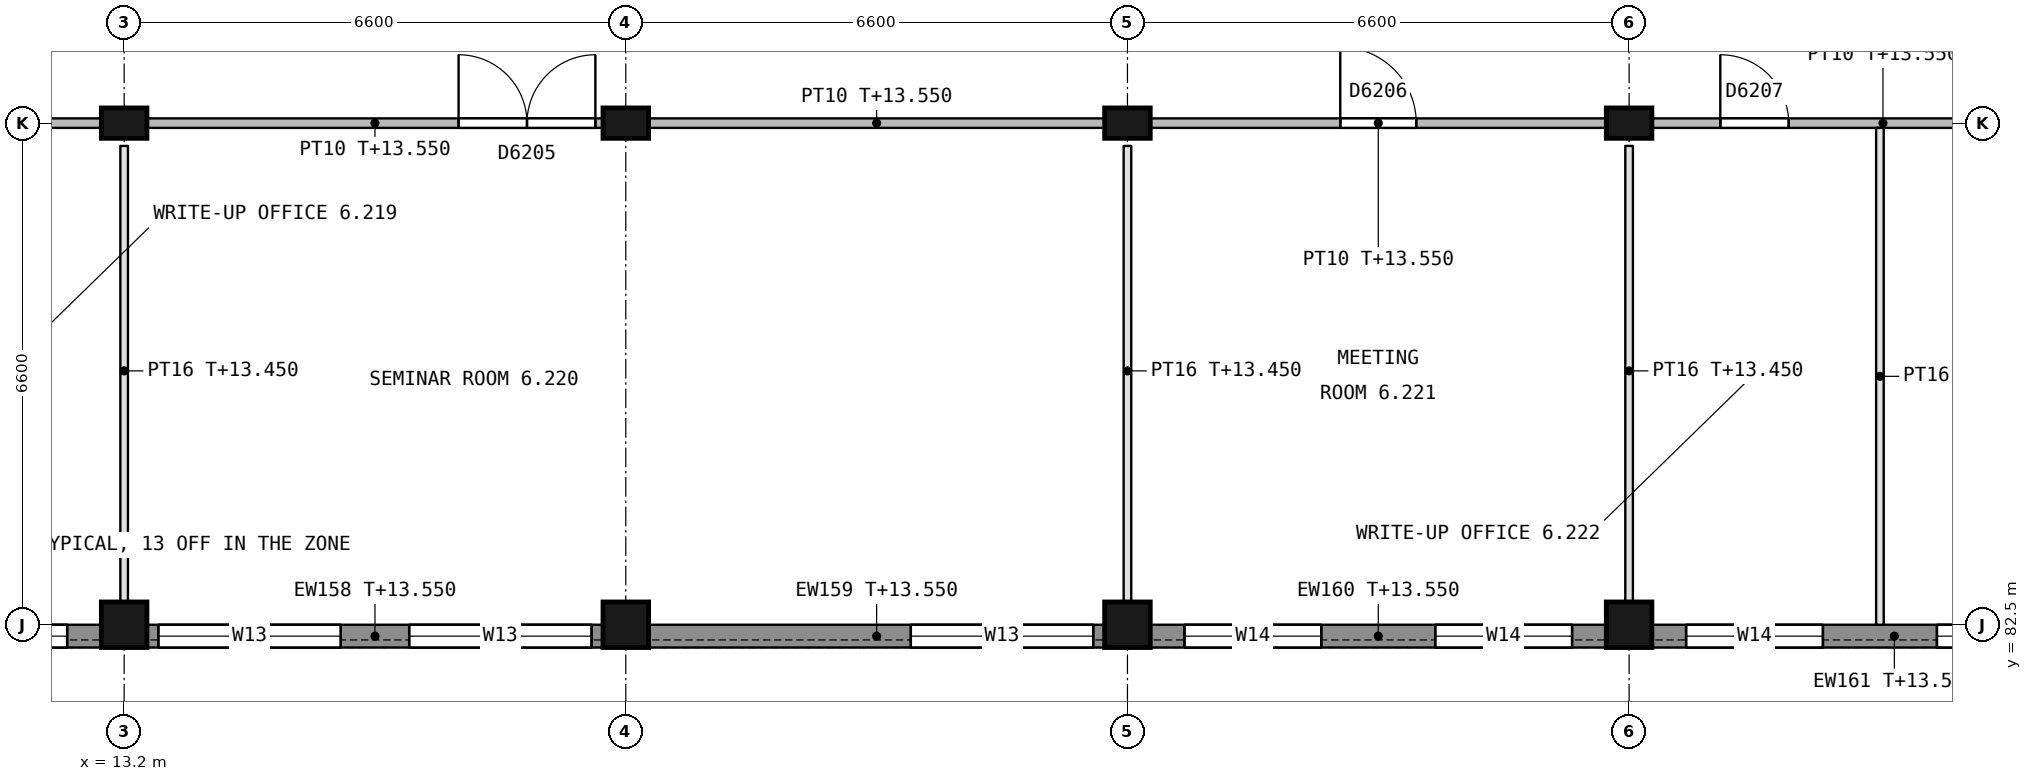
"""IFC4 building model, lengths in metres.
Left out: names, types, materials, properties, quantities, classifications, styles, units other than length and angle.
Written with IfcOpenShell. Run it as: python <this file> out.ifc"""

import sys

from ifc_helpers import new_model, si_unit, direction, frame, frame_2d, origin, origin_2d, place, context, subcontext, project, spatial, rectangle, extrude, element, fill, save


model = new_model("IFC4")
c1 = context("Model", 3, precision=1e-05, world=origin(), true_north=direction((0.0, 1.0)))
c2 = subcontext(c1, "Body", "Model", "MODEL_VIEW")
j1 = project(units=[si_unit("LENGTHUNIT", "METRE"), si_unit("PLANEANGLEUNIT", "RADIAN")], contexts=[c1])
p1 = place(None, origin())
s1 = spatial("IfcSite", under=j1, at=p1, CompositionType="ELEMENT")
p2 = place(p1, origin())
s2 = spatial("IfcBuilding", under=s1, at=p2, CompositionType="ELEMENT")
p3 = place(p2, frame((0.0, 0.0, 9.9)))
s3 = spatial("IfcBuildingStorey", under=s2, at=p3, CompositionType="ELEMENT", Elevation=9.9)
p4 = place(p3, frame((13.2, 82.5, 0.0), z_axis=(0.0, 0.0, 1.0), x_axis=(1.0, 0.0, 0.0)))
e1 = element("IfcColumn", 1, at=p4, inside=s3, PredefinedType="COLUMN", context=c2, shape_type="SweptSolid", body=[
    extrude(rectangle(XDim=0.6, YDim=0.6, at=origin_2d()), origin(), (0.0, 0.0, 1.0), 4.5),
])
p5 = place(p3, frame((13.2, 89.1, 0.0), z_axis=(0.0, 0.0, 1.0), x_axis=(1.0, 0.0, 0.0)))
e2 = element("IfcColumn", 2, at=p5, inside=s3, PredefinedType="COLUMN", context=c2, shape_type="SweptSolid", body=[
    extrude(rectangle(XDim=0.6, YDim=0.4, at=origin_2d()), origin(), (0.0, 0.0, 1.0), 4.5),
])
p6 = place(p3, frame((19.8, 82.5, 0.0), z_axis=(0.0, 0.0, 1.0), x_axis=(1.0, 0.0, 0.0)))
e3 = element("IfcColumn", 3, at=p6, inside=s3, PredefinedType="COLUMN", context=c2, shape_type="SweptSolid", body=[
    extrude(rectangle(XDim=0.6, YDim=0.6, at=origin_2d()), origin(), (0.0, 0.0, 1.0), 4.5),
])
p7 = place(p3, frame((19.8, 89.1, 0.0), z_axis=(0.0, 0.0, 1.0), x_axis=(1.0, 0.0, 0.0)))
e4 = element("IfcColumn", 4, at=p7, inside=s3, PredefinedType="COLUMN", context=c2, shape_type="SweptSolid", body=[
    extrude(rectangle(XDim=0.6, YDim=0.4, at=origin_2d()), origin(), (0.0, 0.0, 1.0), 4.5),
])
p8 = place(p3, frame((26.4, 82.5, 0.0), z_axis=(0.0, 0.0, 1.0), x_axis=(1.0, 0.0, 0.0)))
e5 = element("IfcColumn", 5, at=p8, inside=s3, PredefinedType="COLUMN", context=c2, shape_type="SweptSolid", body=[
    extrude(rectangle(XDim=0.6, YDim=0.6, at=origin_2d()), origin(), (0.0, 0.0, 1.0), 4.5),
])
p9 = place(p3, frame((26.4, 89.1, 0.0), z_axis=(0.0, 0.0, 1.0), x_axis=(1.0, 0.0, 0.0)))
e6 = element("IfcColumn", 6, at=p9, inside=s3, PredefinedType="COLUMN", context=c2, shape_type="SweptSolid", body=[
    extrude(rectangle(XDim=0.6, YDim=0.4, at=origin_2d()), origin(), (0.0, 0.0, 1.0), 4.5),
])
p10 = place(p3, frame((33.0, 82.5, 0.0), z_axis=(0.0, 0.0, 1.0), x_axis=(1.0, 0.0, 0.0)))
e7 = element("IfcColumn", 7, at=p10, inside=s3, PredefinedType="COLUMN", context=c2, shape_type="SweptSolid", body=[
    extrude(rectangle(XDim=0.6, YDim=0.6, at=origin_2d()), origin(), (0.0, 0.0, 1.0), 4.5),
])
p11 = place(p3, frame((33.0, 89.1, 0.0), z_axis=(0.0, 0.0, 1.0), x_axis=(1.0, 0.0, 0.0)))
e8 = element("IfcColumn", 8, at=p11, inside=s3, PredefinedType="COLUMN", context=c2, shape_type="SweptSolid", body=[
    extrude(rectangle(XDim=0.6, YDim=0.4, at=origin_2d()), origin(), (0.0, 0.0, 1.0), 4.5),
])
p12 = place(p3, frame((12.9, 82.35, 0.0), z_axis=(0.0, 0.0, 1.0), x_axis=(-1.0, 0.0, 0.0)))
e9 = element("IfcWall", 9, at=p12, inside=s3, PredefinedType="STANDARD", context=c2, shape_type="SweptSolid", body=[
    extrude(rectangle(XDim=6.0, YDim=0.3, at=frame_2d((3.0, 0.0))), origin(), (0.0, 0.0, 1.0), 3.65),
])
p13 = place(p12, frame((3.75, 0.0, 0.9)))
e10 = element("IfcOpeningElement", 10, at=p13, cuts=e9, PredefinedType="OPENING", context=c2, shape_type="SweptSolid", body=[
    extrude(rectangle(XDim=1.8, YDim=1.5, at=frame_2d((0.9, 0.75))), frame((0.0, 0.16, 0.0), z_axis=(0.0, -1.0, 0.0), x_axis=(1.0, 0.0, 0.0)), (0.0, 0.0, 1.0), 0.32),
])
p14 = place(p12, frame((0.45, 0.0, 0.9)))
e11 = element("IfcOpeningElement", 11, at=p14, cuts=e9, PredefinedType="OPENING", context=c2, shape_type="SweptSolid", body=[
    extrude(rectangle(XDim=1.8, YDim=1.5, at=frame_2d((0.9, 0.75))), frame((0.0, 0.16, 0.0), z_axis=(0.0, -1.0, 0.0), x_axis=(1.0, 0.0, 0.0)), (0.0, 0.0, 1.0), 0.32),
])
p15 = place(p3, frame((19.5, 82.35, 0.0), z_axis=(0.0, 0.0, 1.0), x_axis=(-1.0, 0.0, 0.0)))
e12 = element("IfcWall", 12, at=p15, inside=s3, PredefinedType="STANDARD", context=c2, shape_type="SweptSolid", body=[
    extrude(rectangle(XDim=6.0, YDim=0.3, at=frame_2d((3.0, 0.0))), origin(), (0.0, 0.0, 1.0), 3.65),
])
p16 = place(p15, frame((3.45, 0.0, 0.9)))
e13 = element("IfcOpeningElement", 13, at=p16, cuts=e12, PredefinedType="OPENING", context=c2, shape_type="SweptSolid", body=[
    extrude(rectangle(XDim=2.4, YDim=1.8, at=frame_2d((1.2, 0.9))), frame((0.0, 0.16, 0.0), z_axis=(0.0, -1.0, 0.0), x_axis=(1.0, 0.0, 0.0)), (0.0, 0.0, 1.0), 0.32),
])
p17 = place(p15, frame((0.15, 0.0, 0.9)))
e14 = element("IfcOpeningElement", 14, at=p17, cuts=e12, PredefinedType="OPENING", context=c2, shape_type="SweptSolid", body=[
    extrude(rectangle(XDim=2.4, YDim=1.8, at=frame_2d((1.2, 0.9))), frame((0.0, 0.16, 0.0), z_axis=(0.0, -1.0, 0.0), x_axis=(1.0, 0.0, 0.0)), (0.0, 0.0, 1.0), 0.32),
])
p18 = place(p3, frame((26.1, 82.35, 0.0), z_axis=(0.0, 0.0, 1.0), x_axis=(-1.0, 0.0, 0.0)))
e15 = element("IfcWall", 15, at=p18, inside=s3, PredefinedType="STANDARD", context=c2, shape_type="SweptSolid", body=[
    extrude(rectangle(XDim=6.0, YDim=0.3, at=frame_2d((3.0, 0.0))), origin(), (0.0, 0.0, 1.0), 3.65),
])
p19 = place(p18, frame((0.15, 0.0, 0.9)))
e16 = element("IfcOpeningElement", 16, at=p19, cuts=e15, PredefinedType="OPENING", context=c2, shape_type="SweptSolid", body=[
    extrude(rectangle(XDim=2.4, YDim=1.8, at=frame_2d((1.2, 0.9))), frame((0.0, 0.16, 0.0), z_axis=(0.0, -1.0, 0.0), x_axis=(1.0, 0.0, 0.0)), (0.0, 0.0, 1.0), 0.32),
])
p20 = place(p3, frame((32.7, 82.35, 0.0), z_axis=(0.0, 0.0, 1.0), x_axis=(-1.0, 0.0, 0.0)))
e17 = element("IfcWall", 17, at=p20, inside=s3, PredefinedType="STANDARD", context=c2, shape_type="SweptSolid", body=[
    extrude(rectangle(XDim=6.0, YDim=0.3, at=frame_2d((3.0, 0.0))), origin(), (0.0, 0.0, 1.0), 3.65),
])
p21 = place(p20, frame((3.75, 0.0, 0.9)))
e18 = element("IfcOpeningElement", 18, at=p21, cuts=e17, PredefinedType="OPENING", context=c2, shape_type="SweptSolid", body=[
    extrude(rectangle(XDim=1.8, YDim=1.5, at=frame_2d((0.9, 0.75))), frame((0.0, 0.16, 0.0), z_axis=(0.0, -1.0, 0.0), x_axis=(1.0, 0.0, 0.0)), (0.0, 0.0, 1.0), 0.32),
])
p22 = place(p20, frame((0.45, 0.0, 0.9)))
e19 = element("IfcOpeningElement", 19, at=p22, cuts=e17, PredefinedType="OPENING", context=c2, shape_type="SweptSolid", body=[
    extrude(rectangle(XDim=1.8, YDim=1.5, at=frame_2d((0.9, 0.75))), frame((0.0, 0.16, 0.0), z_axis=(0.0, -1.0, 0.0), x_axis=(1.0, 0.0, 0.0)), (0.0, 0.0, 1.0), 0.32),
])
p23 = place(p3, frame((39.6, 82.35, 0.0), z_axis=(0.0, 0.0, 1.0), x_axis=(-1.0, 0.0, 0.0)))
e20 = element("IfcWall", 20, at=p23, inside=s3, PredefinedType="STANDARD", context=c2, shape_type="SweptSolid", body=[
    extrude(rectangle(XDim=6.3, YDim=0.3, at=frame_2d((3.15, 0.0))), origin(), (0.0, 0.0, 1.0), 3.65),
])
p24 = place(p23, frame((4.05, 0.0, 0.9)))
e21 = element("IfcOpeningElement", 21, at=p24, cuts=e20, PredefinedType="OPENING", context=c2, shape_type="SweptSolid", body=[
    extrude(rectangle(XDim=1.8, YDim=1.5, at=frame_2d((0.9, 0.75))), frame((0.0, 0.16, 0.0), z_axis=(0.0, -1.0, 0.0), x_axis=(1.0, 0.0, 0.0)), (0.0, 0.0, 1.0), 0.32),
])
p25 = place(p23, frame((0.75, 0.0, 0.9)))
e22 = element("IfcOpeningElement", 22, at=p25, cuts=e20, PredefinedType="OPENING", context=c2, shape_type="SweptSolid", body=[
    extrude(rectangle(XDim=1.8, YDim=1.5, at=frame_2d((0.9, 0.75))), frame((0.0, 0.16, 0.0), z_axis=(0.0, -1.0, 0.0), x_axis=(1.0, 0.0, 0.0)), (0.0, 0.0, 1.0), 0.32),
])
p26 = place(p3, frame((12.9, 89.1, 0.0), z_axis=(0.0, 0.0, 1.0), x_axis=(-1.0, 0.0, 0.0)))
e23 = element("IfcWall", 23, at=p26, inside=s3, PredefinedType="PARTITIONING", context=c2, shape_type="SweptSolid", body=[
    extrude(rectangle(XDim=6.0, YDim=0.125, at=frame_2d((3.0, 0.0))), origin(), (0.0, 0.0, 1.0), 3.65),
])
p27 = place(p26, frame((4.2, 0.0, 0.0)))
e24 = element("IfcOpeningElement", 24, at=p27, cuts=e23, PredefinedType="OPENING", context=c2, shape_type="SweptSolid", body=[
    extrude(rectangle(XDim=0.9, YDim=2.1, at=frame_2d((0.45, 1.05))), frame((0.0, 0.073, 0.0), z_axis=(0.0, -1.0, 0.0), x_axis=(1.0, 0.0, 0.0)), (0.0, 0.0, 1.0), 0.145),
])
p28 = place(p26, frame((0.9, 0.0, 0.0)))
e25 = element("IfcOpeningElement", 25, at=p28, cuts=e23, PredefinedType="OPENING", context=c2, shape_type="SweptSolid", body=[
    extrude(rectangle(XDim=0.9, YDim=2.1, at=frame_2d((0.45, 1.05))), frame((0.0, 0.073, 0.0), z_axis=(0.0, -1.0, 0.0), x_axis=(1.0, 0.0, 0.0)), (0.0, 0.0, 1.0), 0.145),
])
p29 = place(p3, frame((13.5, 89.1, 0.0), z_axis=(0.0, 0.0, 1.0), x_axis=(1.0, 0.0, 0.0)))
e26 = element("IfcWall", 26, at=p29, inside=s3, PredefinedType="PARTITIONING", context=c2, shape_type="SweptSolid", body=[
    extrude(rectangle(XDim=6.0, YDim=0.125, at=frame_2d((3.0, 0.0))), origin(), (0.0, 0.0, 1.0), 3.65),
])
p30 = place(p29, frame((4.1, 0.0, 0.0)))
e27 = element("IfcOpeningElement", 27, at=p30, cuts=e26, PredefinedType="OPENING", context=c2, shape_type="SweptSolid", body=[
    extrude(rectangle(XDim=1.8, YDim=2.1, at=frame_2d((0.9, 1.05))), frame((0.0, 0.073, 0.0), z_axis=(0.0, -1.0, 0.0), x_axis=(1.0, 0.0, 0.0)), (0.0, 0.0, 1.0), 0.145),
])
p31 = place(p3, frame((20.1, 89.1, 0.0), z_axis=(0.0, 0.0, 1.0), x_axis=(1.0, 0.0, 0.0)))
e28 = element("IfcWall", 28, at=p31, inside=s3, PredefinedType="PARTITIONING", context=c2, shape_type="SweptSolid", body=[
    extrude(rectangle(XDim=6.0, YDim=0.125, at=frame_2d((3.0, 0.0))), origin(), (0.0, 0.0, 1.0), 3.65),
])
p32 = place(p3, frame((32.7, 89.1, 0.0), z_axis=(0.0, 0.0, 1.0), x_axis=(-1.0, 0.0, 0.0)))
e29 = element("IfcWall", 29, at=p32, inside=s3, PredefinedType="PARTITIONING", context=c2, shape_type="SweptSolid", body=[
    extrude(rectangle(XDim=6.0, YDim=0.125, at=frame_2d((3.0, 0.0))), origin(), (0.0, 0.0, 1.0), 3.65),
])
p33 = place(p32, frame((2.5, 0.0, 0.0)))
e30 = element("IfcOpeningElement", 30, at=p33, cuts=e29, PredefinedType="OPENING", context=c2, shape_type="SweptSolid", body=[
    extrude(rectangle(XDim=1.0, YDim=2.1, at=frame_2d((0.5, 1.05))), frame((0.0, 0.073, 0.0), z_axis=(0.0, -1.0, 0.0), x_axis=(1.0, 0.0, 0.0)), (0.0, 0.0, 1.0), 0.145),
])
p34 = place(p3, frame((39.3, 89.1, 0.0), z_axis=(0.0, 0.0, 1.0), x_axis=(-1.0, 0.0, 0.0)))
e31 = element("IfcWall", 31, at=p34, inside=s3, PredefinedType="PARTITIONING", context=c2, shape_type="SweptSolid", body=[
    extrude(rectangle(XDim=6.0, YDim=0.125, at=frame_2d((3.0, 0.0))), origin(), (0.0, 0.0, 1.0), 3.65),
])
p35 = place(p34, frame((4.2, 0.0, 0.0)))
e32 = element("IfcOpeningElement", 32, at=p35, cuts=e31, PredefinedType="OPENING", context=c2, shape_type="SweptSolid", body=[
    extrude(rectangle(XDim=0.9, YDim=2.1, at=frame_2d((0.45, 1.05))), frame((0.0, 0.073, 0.0), z_axis=(0.0, -1.0, 0.0), x_axis=(1.0, 0.0, 0.0)), (0.0, 0.0, 1.0), 0.145),
])
p36 = place(p34, frame((0.9, 0.0, 0.0)))
e33 = element("IfcOpeningElement", 33, at=p36, cuts=e31, PredefinedType="OPENING", context=c2, shape_type="SweptSolid", body=[
    extrude(rectangle(XDim=0.9, YDim=2.1, at=frame_2d((0.45, 1.05))), frame((0.0, 0.073, 0.0), z_axis=(0.0, -1.0, 0.0), x_axis=(1.0, 0.0, 0.0)), (0.0, 0.0, 1.0), 0.145),
])
for number, where, z_axis, x_axis in (
    (34, (13.2, 82.8, 0.0), (0.0, 0.0, 1.0), (0.0, 1.0, 0.0)),
    (35, (26.4, 82.8, 0.0), (0.0, 0.0, 1.0), (0.0, 1.0, 0.0)),
    (36, (33.0, 82.8, 0.0), (0.0, 0.0, 1.0), (0.0, 1.0, 0.0)),
):
    element("IfcWall", number, at=place(p3, frame(where, z_axis=z_axis, x_axis=x_axis)), inside=s3, PredefinedType="PARTITIONING", context=c2, shape_type="SweptSolid", body=[
        extrude(rectangle(XDim=6.0, YDim=0.1, at=frame_2d((3.0, 0.0))), origin(), (0.0, 0.0, 1.0), 3.55),
    ])
p37 = place(p3, frame((36.3, 82.5, 0.0), z_axis=(0.0, 0.0, 1.0), x_axis=(0.0, 1.0, 0.0)))
e37 = element("IfcWall", 37, at=p37, inside=s3, PredefinedType="PARTITIONING", context=c2, shape_type="SweptSolid", body=[
    extrude(rectangle(XDim=6.537, YDim=0.1, at=frame_2d((3.269, 0.0))), origin(), (0.0, 0.0, 1.0), 3.65),
])
p38 = place(p14, origin())
e38 = element("IfcWindow", 38, at=p38, inside=s3, PartitioningType="SINGLE_PANEL", PredefinedType="WINDOW", context=c2, shape_type="SweptSolid", body=[
    extrude(rectangle(XDim=1.8, YDim=1.5, at=frame_2d((0.9, 0.75))), frame((0.0, 0.03, 0.0), z_axis=(0.0, -1.0, 0.0), x_axis=(1.0, 0.0, 0.0)), (0.0, 0.0, 1.0), 0.06),
])
fill(e11, e38)
p39 = place(p16, origin())
e39 = element("IfcWindow", 39, at=p39, inside=s3, PartitioningType="SINGLE_PANEL", PredefinedType="WINDOW", context=c2, shape_type="SweptSolid", body=[
    extrude(rectangle(XDim=2.4, YDim=1.8, at=frame_2d((1.2, 0.9))), frame((0.0, 0.03, 0.0), z_axis=(0.0, -1.0, 0.0), x_axis=(1.0, 0.0, 0.0)), (0.0, 0.0, 1.0), 0.06),
])
fill(e13, e39)
p40 = place(p17, origin())
e40 = element("IfcWindow", 40, at=p40, inside=s3, PartitioningType="SINGLE_PANEL", PredefinedType="WINDOW", context=c2, shape_type="SweptSolid", body=[
    extrude(rectangle(XDim=2.4, YDim=1.8, at=frame_2d((1.2, 0.9))), frame((0.0, 0.03, 0.0), z_axis=(0.0, -1.0, 0.0), x_axis=(1.0, 0.0, 0.0)), (0.0, 0.0, 1.0), 0.06),
])
fill(e14, e40)
p41 = place(p19, origin())
e41 = element("IfcWindow", 41, at=p41, inside=s3, PartitioningType="SINGLE_PANEL", PredefinedType="WINDOW", context=c2, shape_type="SweptSolid", body=[
    extrude(rectangle(XDim=2.4, YDim=1.8, at=frame_2d((1.2, 0.9))), frame((0.0, 0.03, 0.0), z_axis=(0.0, -1.0, 0.0), x_axis=(1.0, 0.0, 0.0)), (0.0, 0.0, 1.0), 0.06),
])
fill(e16, e41)
p42 = place(p21, origin())
e42 = element("IfcWindow", 42, at=p42, inside=s3, PartitioningType="SINGLE_PANEL", PredefinedType="WINDOW", context=c2, shape_type="SweptSolid", body=[
    extrude(rectangle(XDim=1.8, YDim=1.5, at=frame_2d((0.9, 0.75))), frame((0.0, 0.03, 0.0), z_axis=(0.0, -1.0, 0.0), x_axis=(1.0, 0.0, 0.0)), (0.0, 0.0, 1.0), 0.06),
])
fill(e18, e42)
p43 = place(p22, origin())
e43 = element("IfcWindow", 43, at=p43, inside=s3, PartitioningType="SINGLE_PANEL", PredefinedType="WINDOW", context=c2, shape_type="SweptSolid", body=[
    extrude(rectangle(XDim=1.8, YDim=1.5, at=frame_2d((0.9, 0.75))), frame((0.0, 0.03, 0.0), z_axis=(0.0, -1.0, 0.0), x_axis=(1.0, 0.0, 0.0)), (0.0, 0.0, 1.0), 0.06),
])
fill(e19, e43)
p44 = place(p24, origin())
e44 = element("IfcWindow", 44, at=p44, inside=s3, PartitioningType="SINGLE_PANEL", PredefinedType="WINDOW", context=c2, shape_type="SweptSolid", body=[
    extrude(rectangle(XDim=1.8, YDim=1.5, at=frame_2d((0.9, 0.75))), frame((0.0, 0.03, 0.0), z_axis=(0.0, -1.0, 0.0), x_axis=(1.0, 0.0, 0.0)), (0.0, 0.0, 1.0), 0.06),
])
fill(e21, e44)
p45 = place(p25, origin())
e45 = element("IfcWindow", 45, at=p45, inside=s3, PartitioningType="SINGLE_PANEL", PredefinedType="WINDOW", context=c2, shape_type="SweptSolid", body=[
    extrude(rectangle(XDim=1.8, YDim=1.5, at=frame_2d((0.9, 0.75))), frame((0.0, 0.03, 0.0), z_axis=(0.0, -1.0, 0.0), x_axis=(1.0, 0.0, 0.0)), (0.0, 0.0, 1.0), 0.06),
])
fill(e22, e45)
p46 = place(p30, origin())
e46 = element("IfcDoor", 46, at=p46, inside=s3, OperationType="DOUBLE_DOOR_SINGLE_SWING", PredefinedType="DOOR", context=c2, shape_type="SweptSolid", body=[
    extrude(rectangle(XDim=1.8, YDim=2.1, at=frame_2d((0.9, 1.05))), frame((0.0, 0.025, 0.0), z_axis=(0.0, -1.0, 0.0), x_axis=(1.0, 0.0, 0.0)), (0.0, 0.0, 1.0), 0.05),
])
fill(e27, e46)
p47 = place(p33, origin())
e47 = element("IfcDoor", 47, at=p47, inside=s3, OperationType="SINGLE_SWING_RIGHT", PredefinedType="DOOR", context=c2, shape_type="SweptSolid", body=[
    extrude(rectangle(XDim=1.0, YDim=2.1, at=frame_2d((0.5, 1.05))), frame((0.0, 0.025, 0.0), z_axis=(0.0, -1.0, 0.0), x_axis=(1.0, 0.0, 0.0)), (0.0, 0.0, 1.0), 0.05),
])
fill(e30, e47)
p48 = place(p35, origin())
e48 = element("IfcDoor", 48, at=p48, inside=s3, OperationType="SINGLE_SWING_RIGHT", PredefinedType="DOOR", context=c2, shape_type="SweptSolid", body=[
    extrude(rectangle(XDim=0.9, YDim=2.1, at=frame_2d((0.45, 1.05))), frame((0.0, 0.025, 0.0), z_axis=(0.0, -1.0, 0.0), x_axis=(1.0, 0.0, 0.0)), (0.0, 0.0, 1.0), 0.05),
])
fill(e32, e48)
save(model, sys.argv[1])
